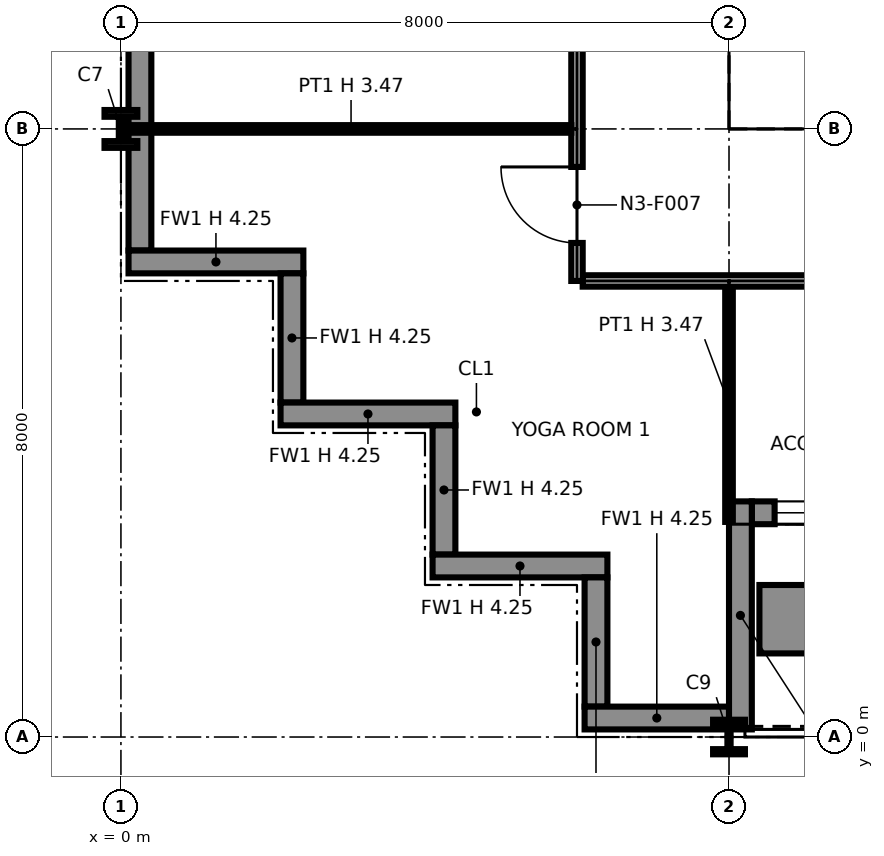
"""IFC4 building model, lengths in metres.
Left out: names, types, materials, properties, quantities, classifications, styles, units other than length and angle.
Written with IfcOpenShell. Run it as: python <this file> out.ifc"""

import sys

from ifc_helpers import new_model, si_unit, direction, frame, frame_2d, origin, origin_2d, place, context, subcontext, project, spatial, polyline, rectangle, i_section, outline, extrude, element, fill, save


model = new_model("IFC4")
c1 = context("Model", 3, precision=1e-05, world=origin(), true_north=direction((0.0, 1.0)))
c2 = subcontext(c1, "Body", "Model", "MODEL_VIEW")
j1 = project(units=[si_unit("LENGTHUNIT", "METRE"), si_unit("PLANEANGLEUNIT", "RADIAN")], contexts=[c1])
p1 = place(None, origin())
s1 = spatial("IfcSite", under=j1, at=p1, CompositionType="ELEMENT")
p2 = place(p1, origin())
s2 = spatial("IfcBuilding", under=s1, at=p2, CompositionType="ELEMENT")
p3 = place(p2, frame((0.0, 0.0, 65.6)))
s3 = spatial("IfcBuildingStorey", under=s2, at=p3, CompositionType="ELEMENT", Elevation=65.6)
p4 = place(p3, frame((0.0, 8.0, 0.0), z_axis=(0.0, 0.0, 1.0), x_axis=(1.0, 0.0, 0.0)))
e1 = element("IfcColumn", 1, at=p4, inside=s3, PredefinedType="COLUMN", context=c2, shape_type="SweptSolid", body=[
    extrude(i_section(OverallWidth=0.432, OverallDepth=0.498, WebThickness=0.056, FlangeThickness=0.089, at=origin_2d()), origin(), (0.0, 0.0, 1.0), 4.25),
])
p5 = place(p3, frame((8.0, 0.0, 0.0), z_axis=(0.0, 0.0, 1.0), x_axis=(1.0, 0.0, 0.0)))
e2 = element("IfcColumn", 2, at=p5, inside=s3, PredefinedType="COLUMN", context=c2, shape_type="SweptSolid", body=[
    extrude(i_section(OverallWidth=0.419, OverallDepth=0.455, WebThickness=0.042, FlangeThickness=0.068, at=origin_2d()), origin(), (0.0, 0.0, 1.0), 4.25),
])
p6 = place(p3, frame((8.0, 8.0, 0.0), z_axis=(0.0, 0.0, 1.0), x_axis=(1.0, 0.0, 0.0)))
e3 = element("IfcColumn", 3, at=p6, inside=s3, PredefinedType="COLUMN", context=c2, shape_type="SweptSolid", body=[
    extrude(i_section(OverallWidth=0.406, OverallDepth=0.417, WebThickness=0.03, FlangeThickness=0.048, at=origin_2d()), origin(), (0.0, 0.0, 1.0), 4.25),
])
p7 = place(p3, frame((0.25, 16.0, 0.0), z_axis=(0.0, 0.0, 1.0), x_axis=(0.0, -1.0, 0.0)))
e4 = element("IfcWall", 4, at=p7, inside=s3, PredefinedType="SOLIDWALL", context=c2, shape_type="SweptSolid", body=[
    extrude(rectangle(XDim=9.6, YDim=0.3, at=frame_2d((4.8, 0.0))), origin(), (0.0, 0.0, 1.0), 4.25),
])
p8 = place(p3, frame((0.1, 6.25, 0.0), z_axis=(0.0, 0.0, 1.0), x_axis=(1.0, 0.0, 0.0)))
e5 = element("IfcWall", 5, at=p8, inside=s3, PredefinedType="SOLIDWALL", context=c2, shape_type="SweptSolid", body=[
    extrude(rectangle(XDim=2.3, YDim=0.3, at=frame_2d((1.15, 0.0))), origin(), (0.0, 0.0, 1.0), 4.25),
])
p9 = place(p3, frame((2.25, 6.1, 0.0), z_axis=(0.0, 0.0, 1.0), x_axis=(0.0, -1.0, 0.0)))
e6 = element("IfcWall", 6, at=p9, inside=s3, PredefinedType="SOLIDWALL", context=c2, shape_type="SweptSolid", body=[
    extrude(rectangle(XDim=1.7, YDim=0.3, at=frame_2d((0.85, 0.0))), origin(), (0.0, 0.0, 1.0), 4.25),
])
p10 = place(p3, frame((2.1, 4.25, 0.0), z_axis=(0.0, 0.0, 1.0), x_axis=(1.0, 0.0, 0.0)))
e7 = element("IfcWall", 7, at=p10, inside=s3, PredefinedType="SOLIDWALL", context=c2, shape_type="SweptSolid", body=[
    extrude(rectangle(XDim=2.3, YDim=0.3, at=frame_2d((1.15, 0.0))), origin(), (0.0, 0.0, 1.0), 4.25),
])
p11 = place(p3, frame((4.25, 4.1, 0.0), z_axis=(0.0, 0.0, 1.0), x_axis=(0.0, -1.0, 0.0)))
e8 = element("IfcWall", 8, at=p11, inside=s3, PredefinedType="SOLIDWALL", context=c2, shape_type="SweptSolid", body=[
    extrude(rectangle(XDim=1.7, YDim=0.3, at=frame_2d((0.85, 0.0))), origin(), (0.0, 0.0, 1.0), 4.25),
])
p12 = place(p3, frame((4.1, 2.25, 0.0), z_axis=(0.0, 0.0, 1.0), x_axis=(1.0, 0.0, 0.0)))
e9 = element("IfcWall", 9, at=p12, inside=s3, PredefinedType="SOLIDWALL", context=c2, shape_type="SweptSolid", body=[
    extrude(rectangle(XDim=2.3, YDim=0.3, at=frame_2d((1.15, 0.0))), origin(), (0.0, 0.0, 1.0), 4.25),
])
p13 = place(p3, frame((6.25, 2.1, 0.0), z_axis=(0.0, 0.0, 1.0), x_axis=(0.0, -1.0, 0.0)))
e10 = element("IfcWall", 10, at=p13, inside=s3, PredefinedType="SOLIDWALL", context=c2, shape_type="SweptSolid", body=[
    extrude(rectangle(XDim=1.7, YDim=0.3, at=frame_2d((0.85, 0.0))), origin(), (0.0, 0.0, 1.0), 4.25),
])
p14 = place(p3, frame((6.1, 0.25, 0.0), z_axis=(0.0, 0.0, 1.0), x_axis=(1.0, 0.0, 0.0)))
e11 = element("IfcWall", 11, at=p14, inside=s3, PredefinedType="SOLIDWALL", context=c2, shape_type="SweptSolid", body=[
    extrude(rectangle(XDim=1.9, YDim=0.3, at=frame_2d((0.95, 0.0))), origin(), (0.0, 0.0, 1.0), 4.25),
])
p15 = place(p3, frame((8.3, 2.95, 0.0), z_axis=(0.0, 0.0, 1.0), x_axis=(1.0, 0.0, 0.0)))
e12 = element("IfcWall", 12, at=p15, inside=s3, PredefinedType="SOLIDWALL", context=c2, shape_type="SweptSolid", body=[
    extrude(rectangle(XDim=7.4, YDim=0.3, at=frame_2d((3.7, 0.0))), origin(), (0.0, 0.0, 1.0), 4.25),
])
p16 = place(p15, frame((0.3, 0.0, 0.9)))
e13 = element("IfcOpeningElement", 13, at=p16, cuts=e12, PredefinedType="OPENING", context=c2, shape_type="SweptSolid", body=[
    extrude(rectangle(XDim=2.8, YDim=2.2, at=frame_2d((1.4, 1.1))), frame((0.0, 0.16, 0.0), z_axis=(0.0, -1.0, 0.0), x_axis=(1.0, 0.0, 0.0)), (0.0, 0.0, 1.0), 0.32),
])
p17 = place(p15, frame((4.7, 0.0, 0.0)))
e14 = element("IfcOpeningElement", 14, at=p17, cuts=e12, PredefinedType="OPENING", context=c2, shape_type="SweptSolid", body=[
    extrude(rectangle(XDim=2.0, YDim=2.4, at=frame_2d((1.0, 1.2))), frame((0.0, 0.16, 0.0), z_axis=(0.0, -1.0, 0.0), x_axis=(1.0, 0.0, 0.0)), (0.0, 0.0, 1.0), 0.32),
])
p18 = place(p3, frame((8.15, 0.1, 0.0), z_axis=(0.0, 0.0, 1.0), x_axis=(0.0, 1.0, 0.0)))
e15 = element("IfcWall", 15, at=p18, inside=s3, PredefinedType="SOLIDWALL", context=c2, shape_type="SweptSolid", body=[
    extrude(rectangle(XDim=3.0, YDim=0.3, at=frame_2d((1.5, 0.0))), origin(), (0.0, 0.0, 1.0), 3.469),
])
p19 = place(p3, frame((8.4, 1.55, 0.0), z_axis=(0.0, 0.0, 1.0), x_axis=(1.0, 0.0, 0.0)))
e16 = element("IfcWall", 16, at=p19, inside=s3, PredefinedType="SOLIDWALL", context=c2, shape_type="SweptSolid", body=[
    extrude(rectangle(XDim=3.2, YDim=0.9, at=frame_2d((1.6, 0.0))), origin(), (0.0, 0.0, 1.0), 0.6),
])
p20 = place(p3, frame((8.65, 8.75, 0.0), z_axis=(0.0, 0.0, 1.0), x_axis=(1.0, 0.0, 0.0)))
e17 = element("IfcWall", 17, at=p20, inside=s3, PredefinedType="PARTITIONING", context=c2, shape_type="SweptSolid", body=[
    extrude(outline(polyline([(0.0, 0.0), (14.7, 0.0), (14.7, 4.25), (7.469, 4.25), (7.469, 3.632), (7.231, 3.632), (7.23, 4.25), (0.0, 4.25), (0.0, 0.0)])), frame((0.0, 0.1, 0.0), z_axis=(0.0, -1.0, 0.0), x_axis=(1.0, 0.0, 0.0)), (0.0, 0.0, 1.0), 0.2),
])
p21 = place(p20, frame((1.3, 0.0, 0.0)))
e18 = element("IfcOpeningElement", 18, at=p21, cuts=e17, PredefinedType="OPENING", context=c2, shape_type="SweptSolid", body=[
    extrude(rectangle(XDim=1.4, YDim=2.1, at=frame_2d((0.7, 1.05))), frame((0.0, 0.11, 0.0), z_axis=(0.0, -1.0, 0.0), x_axis=(1.0, 0.0, 0.0)), (0.0, 0.0, 1.0), 0.22),
])
p22 = place(p20, frame((4.6, 0.0, 0.0)))
e19 = element("IfcOpeningElement", 19, at=p22, cuts=e17, PredefinedType="OPENING", context=c2, shape_type="SweptSolid", body=[
    extrude(rectangle(XDim=1.4, YDim=2.1, at=frame_2d((0.7, 1.05))), frame((0.0, 0.11, 0.0), z_axis=(0.0, -1.0, 0.0), x_axis=(1.0, 0.0, 0.0)), (0.0, 0.0, 1.0), 0.22),
])
p23 = place(p20, frame((10.4, 0.0, 0.0)))
e20 = element("IfcOpeningElement", 20, at=p23, cuts=e17, PredefinedType="OPENING", context=c2, shape_type="SweptSolid", body=[
    extrude(rectangle(XDim=1.2, YDim=2.1, at=frame_2d((0.6, 1.05))), frame((0.0, 0.11, 0.0), z_axis=(0.0, -1.0, 0.0), x_axis=(1.0, 0.0, 0.0)), (0.0, 0.0, 1.0), 0.22),
])
p24 = place(p3, frame((8.75, 8.85, 0.0), z_axis=(0.0, 0.0, 1.0), x_axis=(0.0, 1.0, 0.0)))
e21 = element("IfcWall", 21, at=p24, inside=s3, PredefinedType="PARTITIONING", context=c2, shape_type="SweptSolid", body=[
    extrude(outline(polyline([(0.0, 0.0), (14.3, 0.0), (14.3, 4.25), (10.231, 4.25), (10.23, 3.789), (10.07, 3.789), (10.069, 4.25), (7.27, 4.25), (7.269, 3.632), (7.031, 3.632), (7.031, 4.25), (0.0, 4.25), (0.0, 0.0)])), frame((0.0, 0.1, 0.0), z_axis=(0.0, -1.0, 0.0), x_axis=(1.0, 0.0, 0.0)), (0.0, 0.0, 1.0), 0.2),
])
p25 = place(p24, frame((8.3, 0.0, 0.0)))
e22 = element("IfcOpeningElement", 22, at=p25, cuts=e21, PredefinedType="OPENING", context=c2, shape_type="SweptSolid", body=[
    extrude(rectangle(XDim=1.8, YDim=2.1, at=frame_2d((0.9, 1.05))), frame((0.0, 0.11, 0.0), z_axis=(0.0, -1.0, 0.0), x_axis=(1.0, 0.0, 0.0)), (0.0, 0.0, 1.0), 0.22),
])
p26 = place(p3, frame((8.0, 2.83, 0.0), z_axis=(0.0, 0.0, 1.0), x_axis=(0.0, 1.0, 0.0)))
e23 = element("IfcWall", 23, at=p26, inside=s3, PredefinedType="PARTITIONING", context=c2, shape_type="SweptSolid", body=[
    extrude(rectangle(XDim=3.095, YDim=0.1, at=frame_2d((1.547, 0.0))), origin(), (0.0, 0.0, 1.0), 3.47),
])
p27 = place(p3, frame((6.075, 6.0, 0.0), z_axis=(0.0, 0.0, 1.0), x_axis=(1.0, 0.0, 0.0)))
e24 = element("IfcWall", 24, at=p27, inside=s3, PredefinedType="PARTITIONING", context=c2, shape_type="SweptSolid", body=[
    extrude(rectangle(XDim=19.85, YDim=0.15, at=frame_2d((9.925, 0.0))), origin(), (0.0, 0.0, 1.0), 4.25),
])
p28 = place(p27, frame((12.425, 0.0, 0.0), z_axis=(0.0, 0.0, 1.0), x_axis=(-1.0, 0.0, 0.0)))
e25 = element("IfcOpeningElement", 25, at=p28, cuts=e24, PredefinedType="OPENING", context=c2, shape_type="SweptSolid", body=[
    extrude(rectangle(XDim=1.0, YDim=2.1, at=frame_2d((0.5, 1.05))), frame((0.0, 0.085, 0.0), z_axis=(0.0, -1.0, 0.0), x_axis=(1.0, 0.0, 0.0)), (0.0, 0.0, 1.0), 0.17),
])
p29 = place(p27, frame((16.425, 0.0, 0.0), z_axis=(0.0, 0.0, 1.0), x_axis=(-1.0, 0.0, 0.0)))
e26 = element("IfcOpeningElement", 26, at=p29, cuts=e24, PredefinedType="OPENING", context=c2, shape_type="SweptSolid", body=[
    extrude(rectangle(XDim=1.0, YDim=2.1, at=frame_2d((0.5, 1.05))), frame((0.0, 0.085, 0.0), z_axis=(0.0, -1.0, 0.0), x_axis=(1.0, 0.0, 0.0)), (0.0, 0.0, 1.0), 0.17),
])
p30 = place(p27, frame((4.425, 0.0, 0.0), z_axis=(0.0, 0.0, 1.0), x_axis=(-1.0, 0.0, 0.0)))
e27 = element("IfcOpeningElement", 27, at=p30, cuts=e24, PredefinedType="OPENING", context=c2, shape_type="SweptSolid", body=[
    extrude(rectangle(XDim=1.0, YDim=2.1, at=frame_2d((0.5, 1.05))), frame((0.0, 0.085, 0.0), z_axis=(0.0, -1.0, 0.0), x_axis=(1.0, 0.0, 0.0)), (0.0, 0.0, 1.0), 0.17),
])
p31 = place(p27, frame((8.425, 0.0, 0.0), z_axis=(0.0, 0.0, 1.0), x_axis=(-1.0, 0.0, 0.0)))
e28 = element("IfcOpeningElement", 28, at=p31, cuts=e24, PredefinedType="OPENING", context=c2, shape_type="SweptSolid", body=[
    extrude(rectangle(XDim=1.0, YDim=2.1, at=frame_2d((0.5, 1.05))), frame((0.0, 0.085, 0.0), z_axis=(0.0, -1.0, 0.0), x_axis=(1.0, 0.0, 0.0)), (0.0, 0.0, 1.0), 0.17),
])
p32 = place(p27, frame((19.425, 0.0, 0.0), z_axis=(0.0, 0.0, 1.0), x_axis=(-1.0, 0.0, 0.0)))
e29 = element("IfcOpeningElement", 29, at=p32, cuts=e24, PredefinedType="OPENING", context=c2, shape_type="SweptSolid", body=[
    extrude(rectangle(XDim=1.0, YDim=2.1, at=frame_2d((0.5, 1.05))), frame((0.0, 0.085, 0.0), z_axis=(0.0, -1.0, 0.0), x_axis=(1.0, 0.0, 0.0)), (0.0, 0.0, 1.0), 0.17),
])
p33 = place(p3, frame((6.0, 6.0, 0.0), z_axis=(0.0, 0.0, 1.0), x_axis=(0.0, 1.0, 0.0)))
e30 = element("IfcWall", 30, at=p33, inside=s3, PredefinedType="PARTITIONING", context=c2, shape_type="SweptSolid", body=[
    extrude(outline(polyline([(0.0, 0.0), (19.925, 0.0), (19.925, 4.25), (18.3, 4.25), (18.298, 3.47), (17.702, 3.47), (17.7, 4.25), (14.3, 4.25), (14.298, 3.47), (13.702, 3.47), (13.7, 4.25), (10.3, 4.25), (10.298, 3.47), (9.702, 3.47), (9.7, 4.25), (6.3, 4.25), (6.298, 3.47), (5.702, 3.47), (5.7, 4.25), (2.3, 4.25), (2.298, 3.47), (1.702, 3.47), (1.7, 4.25), (0.0, 4.25), (0.0, 0.0)])), frame((0.0, 0.075, 0.0), z_axis=(0.0, -1.0, 0.0), x_axis=(1.0, 0.0, 0.0)), (0.0, 0.0, 1.0), 0.15),
])
p34 = place(p33, frame((0.5, 0.0, 0.0)))
e31 = element("IfcOpeningElement", 31, at=p34, cuts=e30, PredefinedType="OPENING", context=c2, shape_type="SweptSolid", body=[
    extrude(rectangle(XDim=1.0, YDim=2.1, at=frame_2d((0.5, 1.05))), frame((0.0, 0.085, 0.0), z_axis=(0.0, -1.0, 0.0), x_axis=(1.0, 0.0, 0.0)), (0.0, 0.0, 1.0), 0.17),
])
p35 = place(p33, frame((3.5, 0.0, 0.0)))
e32 = element("IfcOpeningElement", 32, at=p35, cuts=e30, PredefinedType="OPENING", context=c2, shape_type="SweptSolid", body=[
    extrude(rectangle(XDim=1.0, YDim=2.1, at=frame_2d((0.5, 1.05))), frame((0.0, 0.085, 0.0), z_axis=(0.0, -1.0, 0.0), x_axis=(1.0, 0.0, 0.0)), (0.0, 0.0, 1.0), 0.17),
])
p36 = place(p33, frame((7.5, 0.0, 0.0)))
e33 = element("IfcOpeningElement", 33, at=p36, cuts=e30, PredefinedType="OPENING", context=c2, shape_type="SweptSolid", body=[
    extrude(rectangle(XDim=1.0, YDim=2.1, at=frame_2d((0.5, 1.05))), frame((0.0, 0.085, 0.0), z_axis=(0.0, -1.0, 0.0), x_axis=(1.0, 0.0, 0.0)), (0.0, 0.0, 1.0), 0.17),
])
p37 = place(p33, frame((15.225, 0.0, 0.0)))
e34 = element("IfcOpeningElement", 34, at=p37, cuts=e30, PredefinedType="OPENING", context=c2, shape_type="SweptSolid", body=[
    extrude(rectangle(XDim=1.0, YDim=2.1, at=frame_2d((0.5, 1.05))), frame((0.0, 0.085, 0.0), z_axis=(0.0, -1.0, 0.0), x_axis=(1.0, 0.0, 0.0)), (0.0, 0.0, 1.0), 0.17),
])
p38 = place(p3, frame((0.13, 8.0, 0.0), z_axis=(0.0, 0.0, 1.0), x_axis=(1.0, 0.0, 0.0)))
e35 = element("IfcWall", 35, at=p38, inside=s3, PredefinedType="PARTITIONING", context=c2, shape_type="SweptSolid", body=[
    extrude(rectangle(XDim=5.795, YDim=0.1, at=frame_2d((2.897, 0.0))), origin(), (0.0, 0.0, 1.0), 3.47),
])
p39 = place(p16, origin())
e36 = element("IfcWindow", 36, at=p39, inside=s3, PartitioningType="SINGLE_PANEL", PredefinedType="WINDOW", context=c2, shape_type="SweptSolid", body=[
    extrude(rectangle(XDim=2.8, YDim=2.2, at=frame_2d((1.4, 1.1))), frame((0.0, 0.03, 0.0), z_axis=(0.0, -1.0, 0.0), x_axis=(1.0, 0.0, 0.0)), (0.0, 0.0, 1.0), 0.06),
])
fill(e13, e36)
p40 = place(p34, origin())
e37 = element("IfcDoor", 37, at=p40, inside=s3, OperationType="SINGLE_SWING_RIGHT", PredefinedType="DOOR", context=c2, shape_type="SweptSolid", body=[
    extrude(rectangle(XDim=1.0, YDim=2.1, at=frame_2d((0.5, 1.05))), frame((0.0, 0.025, 0.0), z_axis=(0.0, -1.0, 0.0), x_axis=(1.0, 0.0, 0.0)), (0.0, 0.0, 1.0), 0.05),
])
fill(e31, e37)
save(model, sys.argv[1])
